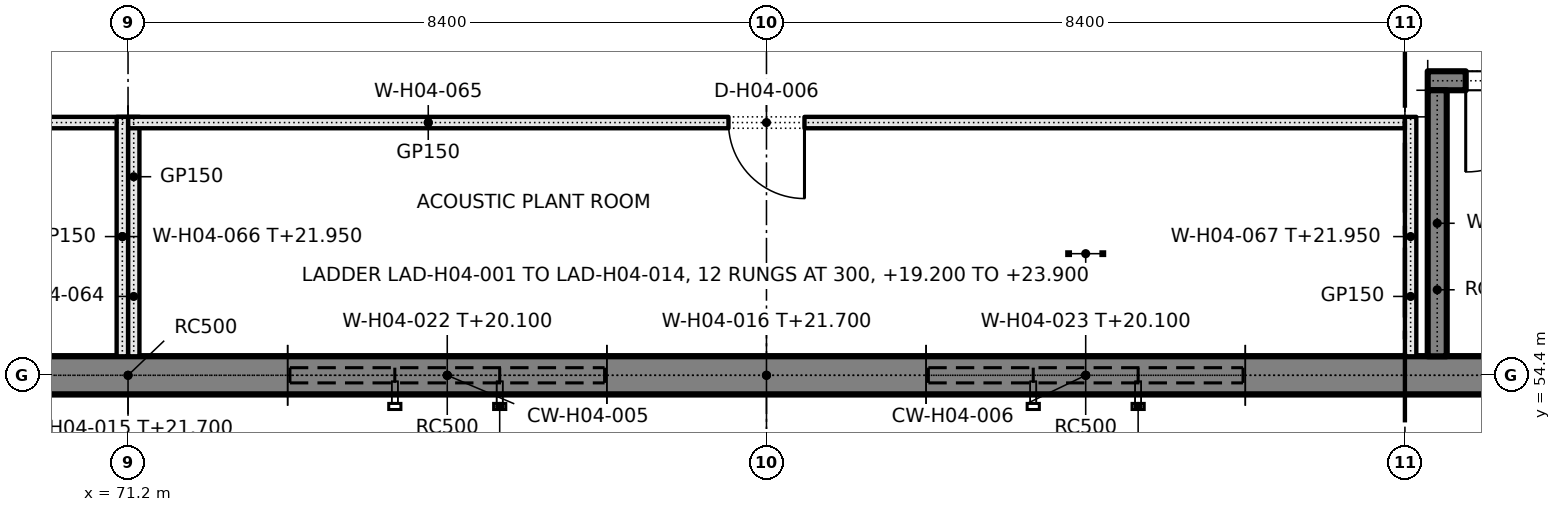
"""IFC4 building model, lengths in metres.
Left out: names, types, materials, properties, quantities, classifications, styles, units other than length and angle.
Written with IfcOpenShell. Run it as: python <this file> out.ifc"""

import sys

from ifc_helpers import new_model, si_unit, direction, frame, frame_2d, origin, place, context, subcontext, project, spatial, rectangle, extrude, element, fill, save


model = new_model("IFC4")
c1 = context("Model", 3, precision=1e-05, world=origin(), true_north=direction((0.0, 1.0)))
c2 = subcontext(c1, "Body", "Model", "MODEL_VIEW")
j1 = project(units=[si_unit("LENGTHUNIT", "METRE"), si_unit("PLANEANGLEUNIT", "RADIAN")], contexts=[c1])
p1 = place(None, origin())
s1 = spatial("IfcSite", under=j1, at=p1, CompositionType="ELEMENT")
p2 = place(p1, origin())
s2 = spatial("IfcBuilding", under=s1, at=p2, CompositionType="ELEMENT")
p3 = place(p2, frame((0.0, 0.0, 19.2)))
s3 = spatial("IfcBuildingStorey", under=s2, at=p3, CompositionType="ELEMENT", Elevation=19.2)
for number, where, z_axis, x_axis in (
    (1, (69.1, 54.4, 0.0), (0.0, 0.0, 1.0), (1.0, 0.0, 0.0)),
    (2, (77.5, 54.4, 0.0), (0.0, 0.0, 1.0), (1.0, 0.0, 0.0)),
):
    element("IfcWall", number, at=place(p3, frame(where, z_axis=z_axis, x_axis=x_axis)), inside=s3, PredefinedType="SOLIDWALL", context=c2, shape_type="SweptSolid", body=[
        extrude(rectangle(XDim=4.2, YDim=0.5, at=frame_2d((2.1, 0.0))), origin(), (0.0, 0.0, 1.0), 2.5),
    ])
p4 = place(p3, frame((85.9, 54.4, 0.0), z_axis=(0.0, 0.0, 1.0), x_axis=(1.0, 0.0, 0.0)))
e3 = element("IfcWall", 3, at=p4, inside=s3, PredefinedType="SOLIDWALL", context=c2, shape_type="SweptSolid", body=[
    extrude(rectangle(XDim=10.25, YDim=0.5, at=frame_2d((5.125, 0.0))), origin(), (0.0, 0.0, 1.0), 2.5),
])
for number, where, z_axis, x_axis in (
    (4, (73.3, 54.4, 0.0), (0.0, 0.0, 1.0), (1.0, 0.0, 0.0)),
    (5, (81.7, 54.4, 0.0), (0.0, 0.0, 1.0), (1.0, 0.0, 0.0)),
):
    element("IfcWall", number, at=place(p3, frame(where, z_axis=z_axis, x_axis=x_axis)), inside=s3, PredefinedType="SOLIDWALL", context=c2, shape_type="SweptSolid", body=[
        extrude(rectangle(XDim=4.2, YDim=0.5, at=frame_2d((2.1, 0.0))), origin(), (0.0, 0.0, 1.0), 0.9),
    ])
p5 = place(p3, frame((29.45, 54.4, 2.5), z_axis=(0.0, 0.0, 1.0), x_axis=(1.0, 0.0, 0.0)))
e6 = element("IfcWall", 6, at=p5, inside=s3, PredefinedType="SOLIDWALL", context=c2, shape_type="SweptSolid", body=[
    extrude(rectangle(XDim=66.7, YDim=0.5, at=frame_2d((33.35, 0.0))), origin(), (0.0, 0.0, 1.0), 1.1),
])
p6 = place(p3, frame((88.3, 58.275, 0.0), z_axis=(0.0, 0.0, 1.0), x_axis=(1.0, 0.0, 0.0)))
e7 = element("IfcWall", 7, at=p6, inside=s3, PredefinedType="SOLIDWALL", context=c2, shape_type="SweptSolid", body=[
    extrude(rectangle(XDim=7.85, YDim=0.25, at=frame_2d((3.925, 0.0))), origin(), (0.0, 0.0, 1.0), 3.35),
])
p7 = place(p6, frame((0.5, 0.0, 0.0)))
e8 = element("IfcOpeningElement", 8, at=p7, cuts=e7, PredefinedType="OPENING", context=c2, shape_type="SweptSolid", body=[
    extrude(rectangle(XDim=1.2, YDim=2.1, at=frame_2d((0.6, 1.05))), frame((0.0, 0.135, 0.0), z_axis=(0.0, -1.0, 0.0), x_axis=(1.0, 0.0, 0.0)), (0.0, 0.0, 1.0), 0.27),
])
p8 = place(p3, frame((88.425, 54.65, 0.0), z_axis=(0.0, 0.0, 1.0), x_axis=(0.0, 1.0, 0.0)))
e9 = element("IfcWall", 9, at=p8, inside=s3, PredefinedType="SOLIDWALL", context=c2, shape_type="SweptSolid", body=[
    extrude(rectangle(XDim=3.5, YDim=0.25, at=frame_2d((1.75, 0.0))), origin(), (0.0, 0.0, 1.0), 3.35),
])
p9 = place(p3, frame((62.8, 57.725, 0.0), z_axis=(0.0, 0.0, 1.0), x_axis=(1.0, 0.0, 0.0)))
e10 = element("IfcWall", 10, at=p9, inside=s3, PredefinedType="PARTITIONING", context=c2, shape_type="SweptSolid", body=[
    extrude(rectangle(XDim=8.4, YDim=0.15, at=frame_2d((4.2, 0.0))), origin(), (0.0, 0.0, 1.0), 3.35),
])
p10 = place(p9, frame((3.7, 0.0, 0.0)))
e11 = element("IfcOpeningElement", 11, at=p10, cuts=e10, PredefinedType="OPENING", context=c2, shape_type="SweptSolid", body=[
    extrude(rectangle(XDim=1.0, YDim=2.1, at=frame_2d((0.5, 1.05))), frame((0.0, 0.085, 0.0), z_axis=(0.0, -1.0, 0.0), x_axis=(1.0, 0.0, 0.0)), (0.0, 0.0, 1.0), 0.17),
])
p11 = place(p3, frame((71.275, 54.65, 0.0), z_axis=(0.0, 0.0, 1.0), x_axis=(0.0, 1.0, 0.0)))
e12 = element("IfcWall", 12, at=p11, inside=s3, PredefinedType="PARTITIONING", context=c2, shape_type="SweptSolid", body=[
    extrude(rectangle(XDim=3.15, YDim=0.15, at=frame_2d((1.575, 0.0))), origin(), (0.0, 0.0, 1.0), 3.35),
])
p12 = place(p3, frame((71.2, 57.725, 0.0), z_axis=(0.0, 0.0, 1.0), x_axis=(1.0, 0.0, 0.0)))
e13 = element("IfcWall", 13, at=p12, inside=s3, PredefinedType="PARTITIONING", context=c2, shape_type="SweptSolid", body=[
    extrude(rectangle(XDim=16.8, YDim=0.15, at=frame_2d((8.4, 0.0))), origin(), (0.0, 0.0, 1.0), 3.35),
])
p13 = place(p12, frame((7.9, 0.0, 0.0)))
e14 = element("IfcOpeningElement", 14, at=p13, cuts=e13, PredefinedType="OPENING", context=c2, shape_type="SweptSolid", body=[
    extrude(rectangle(XDim=1.0, YDim=2.1, at=frame_2d((0.5, 1.05))), frame((0.0, 0.085, 0.0), z_axis=(0.0, -1.0, 0.0), x_axis=(1.0, 0.0, 0.0)), (0.0, 0.0, 1.0), 0.17),
])
for number, where, z_axis, x_axis in (
    (15, (71.125, 54.65, 0.0), (0.0, 0.0, 1.0), (0.0, 1.0, 0.0)),
    (16, (88.075, 54.65, 0.0), (0.0, 0.0, 1.0), (0.0, 1.0, 0.0)),
):
    element("IfcWall", number, at=place(p3, frame(where, z_axis=z_axis, x_axis=x_axis)), inside=s3, PredefinedType="PARTITIONING", context=c2, shape_type="SweptSolid", body=[
        extrude(rectangle(XDim=3.15, YDim=0.15, at=frame_2d((1.575, 0.0))), origin(), (0.0, 0.0, 1.0), 2.75),
    ])
p14 = place(p13, frame((1.0, 0.0, 0.0), z_axis=(0.0, 0.0, 1.0), x_axis=(-1.0, 0.0, 0.0)))
e17 = element("IfcDoor", 17, at=p14, inside=s3, OperationType="SINGLE_SWING_LEFT", PredefinedType="DOOR", context=c2, shape_type="SweptSolid", body=[
    extrude(rectangle(XDim=1.0, YDim=2.1, at=frame_2d((0.5, 1.05))), frame((0.0, 0.025, 0.0), z_axis=(0.0, -1.0, 0.0), x_axis=(1.0, 0.0, 0.0)), (0.0, 0.0, 1.0), 0.05),
])
fill(e14, e17)
p15 = place(p7, frame((1.2, 0.0, 0.0), z_axis=(0.0, 0.0, 1.0), x_axis=(-1.0, 0.0, 0.0)))
e18 = element("IfcDoor", 18, at=p15, inside=s3, OperationType="SINGLE_SWING_RIGHT", PredefinedType="DOOR", context=c2, shape_type="SweptSolid", body=[
    extrude(rectangle(XDim=1.2, YDim=2.1, at=frame_2d((0.6, 1.05))), frame((0.0, 0.025, 0.0), z_axis=(0.0, -1.0, 0.0), x_axis=(1.0, 0.0, 0.0)), (0.0, 0.0, 1.0), 0.05),
])
fill(e8, e18)
save(model, sys.argv[1])
